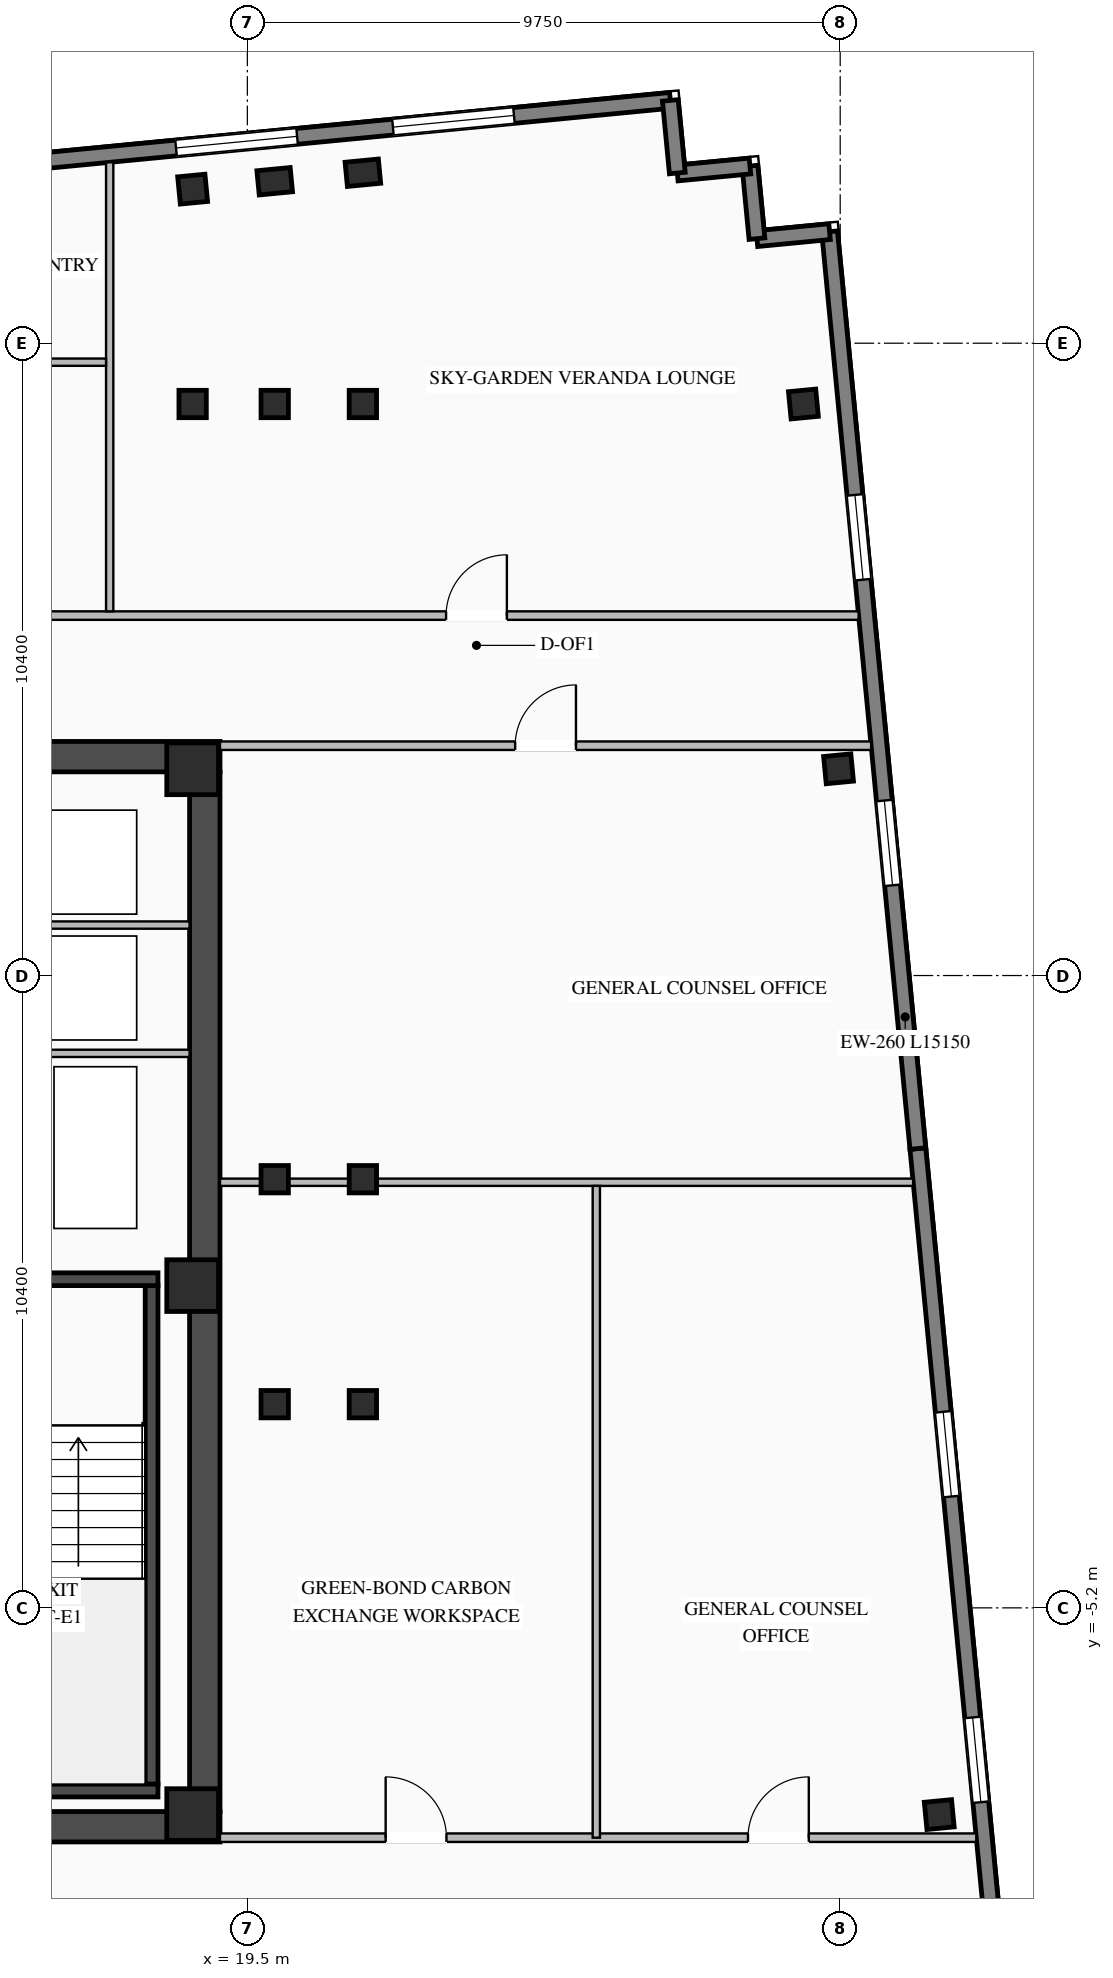
"""IFC4 building model, lengths in metres.
Left out: names, types, materials, properties, quantities, classifications, styles, units other than length and angle.
Written with IfcOpenShell. Run it as: python <this file> out.ifc"""

import sys

from ifc_helpers import new_model, si_unit, direction, frame, frame_2d, origin, origin_2d, place, context, subcontext, project, spatial, rectangle, i_section, extrude, element, fill, save


model = new_model("IFC4")
c1 = context("Model", 3, precision=1e-05, world=origin(), true_north=direction((0.0, 1.0)))
c2 = subcontext(c1, "Body", "Model", "MODEL_VIEW")
j1 = project(units=[si_unit("LENGTHUNIT", "METRE"), si_unit("PLANEANGLEUNIT", "RADIAN")], contexts=[c1])
p1 = place(None, origin())
s1 = spatial("IfcSite", under=j1, at=p1, CompositionType="ELEMENT")
p2 = place(p1, origin())
s2 = spatial("IfcBuilding", under=s1, at=p2, CompositionType="ELEMENT")
p3 = place(p2, frame((0.0, 0.0, 272.4)))
s3 = spatial("IfcBuildingStorey", under=s2, at=p3, CompositionType="ELEMENT", Elevation=272.4)
p4 = place(p3, frame((8.8, -8.8, 0.0), z_axis=(0.0, 0.0, 1.0), x_axis=(1.0, 0.0, 0.0)))
e1 = element("IfcWall", 1, at=p4, inside=s3, PredefinedType="SHEAR", context=c2, shape_type="SweptSolid", body=[
    extrude(rectangle(XDim=10.25, YDim=0.5, at=frame_2d((5.125, 0.0))), origin(), (0.0, 0.0, 1.0), 3.27),
])
p5 = place(p3, frame((8.8, 8.8, 0.0), z_axis=(0.0, 0.0, 1.0), x_axis=(1.0, 0.0, 0.0)))
e2 = element("IfcWall", 2, at=p5, inside=s3, PredefinedType="SHEAR", context=c2, shape_type="SweptSolid", body=[
    extrude(rectangle(XDim=10.25, YDim=0.5, at=frame_2d((5.125, 0.0))), origin(), (0.0, 0.0, 1.0), 3.27),
])
p6 = place(p5, frame((3.25, 0.0, 0.0)))
e3 = element("IfcOpeningElement", 3, at=p6, cuts=e2, PredefinedType="OPENING", context=c2, shape_type="SweptSolid", body=[
    extrude(rectangle(XDim=1.4, YDim=2.05, at=frame_2d((0.7, 1.025))), frame((0.0, 0.26, 0.0), z_axis=(0.0, -1.0, 0.0), x_axis=(1.0, 0.0, 0.0)), (0.0, 0.0, 1.0), 0.52),
])
p7 = place(p3, frame((18.8, -8.55, 0.0), z_axis=(0.0, 0.0, 1.0), x_axis=(0.0, 1.0, 0.0)))
e4 = element("IfcWall", 4, at=p7, inside=s3, PredefinedType="SHEAR", context=c2, shape_type="SweptSolid", body=[
    extrude(rectangle(XDim=17.1, YDim=0.5, at=frame_2d((8.55, 0.0))), origin(), (0.0, 0.0, 1.0), 3.27),
])
p8 = place(p3, frame((17.925, -8.1, 0.0), z_axis=(0.0, 0.0, 1.0), x_axis=(0.0, 1.0, 0.0)))
e5 = element("IfcWall", 5, at=p8, inside=s3, PredefinedType="SHEAR", context=c2, shape_type="SweptSolid", body=[
    extrude(rectangle(XDim=8.2, YDim=0.21, at=frame_2d((4.1, 0.0))), origin(), (0.0, 0.0, 1.0), 3.27),
])
for number, where, z_axis, x_axis in (
    (6, (12.89, -8.205, 0.0), (0.0, 0.0, 1.0), (1.0, 0.0, 0.0)),
    (7, (18.03, 0.205, 0.0), (0.0, 0.0, 1.0), (-1.0, 0.0, 0.0)),
):
    element("IfcWall", number, at=place(p3, frame(where, z_axis=z_axis, x_axis=x_axis)), inside=s3, PredefinedType="SHEAR", context=c2, shape_type="SweptSolid", body=[
        extrude(rectangle(XDim=5.14, YDim=0.21, at=frame_2d((2.57, 0.0))), origin(), (0.0, 0.0, 1.0), 3.27),
    ])
for number, where, z_axis, x_axis in (
    (8, (18.6, -8.6, 0.0), (0.0, 0.0, 1.0), (1.0, 0.0, 0.0)),
    (9, (18.6, 0.1, 0.0), (0.0, 0.0, 1.0), (1.0, 0.0, 0.0)),
    (10, (18.6, 8.6, 0.0), (0.0, 0.0, 1.0), (1.0, 0.0, 0.0)),
):
    element("IfcColumn", number, at=place(p3, frame(where, z_axis=z_axis, x_axis=x_axis)), inside=s3, PredefinedType="COLUMN", context=c2, shape_type="SweptSolid", body=[
        extrude(rectangle(XDim=0.85, YDim=0.85, at=origin_2d()), origin(), (0.0, 0.0, 1.0), 3.45),
    ])
for number, where, z_axis, x_axis in (
    (11, (18.6, 14.6, 0.0), (0.0, 0.0, 1.0), (1.0, 0.0, 0.0)),
    (12, (19.95, 14.6, 0.0), (0.0, 0.0, 1.0), (1.0, 0.0, 0.0)),
    (13, (21.4, 14.6, 0.0), (0.0, 0.0, 1.0), (1.0, 0.0, 0.0)),
    (14, (19.95, -1.85, 0.0), (0.0, 0.0, 1.0), (1.0, 0.0, 0.0)),
    (15, (19.95, 1.85, 0.0), (0.0, 0.0, 1.0), (1.0, 0.0, 0.0)),
    (16, (21.4, -1.85, 0.0), (0.0, 0.0, 1.0), (1.0, 0.0, 0.0)),
    (17, (21.4, 1.85, 0.0), (0.0, 0.0, 1.0), (1.0, 0.0, 0.0)),
    (18, (18.6, 18.134, 0.0), (0.0, 0.0, 1.0), (0.995, 0.096, 0.0)),
    (19, (30.879, -8.6, 0.0), (0.0, 0.0, 1.0), (0.995, 0.096, 0.0)),
    (20, (29.223, 8.6, 0.0), (0.0, 0.0, 1.0), (0.995, 0.096, 0.0)),
    (21, (28.645, 14.6, 0.0), (0.0, 0.0, 1.0), (0.995, 0.096, 0.0)),
):
    element("IfcColumn", number, at=place(p3, frame(where, z_axis=z_axis, x_axis=x_axis)), inside=s3, PredefinedType="COLUMN", context=c2, shape_type="SweptSolid", body=[
        extrude(i_section(OverallWidth=0.45, OverallDepth=0.45, WebThickness=0.022, FlangeThickness=0.032, at=origin_2d()), origin(), (0.0, 0.0, 1.0), 3.45),
    ])
for number, where, z_axis, x_axis in (
    (22, (19.95, 18.264, 0.0), (0.0, 0.0, 1.0), (0.995, 0.096, 0.0)),
    (23, (21.4, 18.403, 0.0), (0.0, 0.0, 1.0), (0.995, 0.096, 0.0)),
):
    element("IfcColumn", number, at=place(p3, frame(where, z_axis=z_axis, x_axis=x_axis)), inside=s3, PredefinedType="PILASTER", context=c2, shape_type="SweptSolid", body=[
        extrude(rectangle(XDim=0.55, YDim=0.4, at=origin_2d()), origin(), (0.0, 0.0, 1.0), 3.45),
    ])
p9 = place(p3, frame((15.756, 18.563, 0.0), z_axis=(0.0, 0.0, 1.0), x_axis=(0.995396745868, 0.095840066339, 0.0)))
e24 = element("IfcWall", 24, at=p9, inside=s3, PredefinedType="STANDARD", context=c2, shape_type="SweptSolid", body=[
    extrude(rectangle(XDim=10.75, YDim=0.26, at=frame_2d((5.375, 0.0))), origin(), (0.0, 0.0, 1.0), 3.25),
])
p10 = place(p9, frame((2.583, 0.0, 0.76)))
e25 = element("IfcOpeningElement", 25, at=p10, cuts=e24, PredefinedType="OPENING", context=c2, shape_type="SweptSolid", body=[
    extrude(rectangle(XDim=2.0, YDim=2.05, at=frame_2d((1.0, 1.025))), frame((0.0, 0.14, 0.0), z_axis=(0.0, -1.0, 0.0), x_axis=(1.0, 0.0, 0.0)), (0.0, 0.0, 1.0), 0.28),
])
p11 = place(p9, frame((6.167, 0.0, 0.76)))
e26 = element("IfcOpeningElement", 26, at=p11, cuts=e24, PredefinedType="OPENING", context=c2, shape_type="SweptSolid", body=[
    extrude(rectangle(XDim=2.0, YDim=2.05, at=frame_2d((1.0, 1.025))), frame((0.0, 0.14, 0.0), z_axis=(0.0, -1.0, 0.0), x_axis=(1.0, 0.0, 0.0)), (0.0, 0.0, 1.0), 0.28),
])
p12 = place(p3, frame((30.527, 2.354, 0.0), z_axis=(0.0, 0.0, 1.0), x_axis=(0.095850890337, -0.995395703638, 0.0)))
e27 = element("IfcWall", 27, at=p12, inside=s3, PredefinedType="STANDARD", context=c2, shape_type="SweptSolid", body=[
    extrude(rectangle(XDim=15.15, YDim=0.26, at=frame_2d((7.575, 0.0))), origin(), (0.0, 0.0, 1.0), 3.25),
])
p13 = place(p12, frame((4.35, 0.0, 0.76)))
e28 = element("IfcOpeningElement", 28, at=p13, cuts=e27, PredefinedType="OPENING", context=c2, shape_type="SweptSolid", body=[
    extrude(rectangle(XDim=1.4, YDim=1.95, at=frame_2d((0.7, 0.975))), frame((0.0, 0.14, 0.0), z_axis=(0.0, -1.0, 0.0), x_axis=(1.0, 0.0, 0.0)), (0.0, 0.0, 1.0), 0.28),
])
p14 = place(p12, frame((9.4, 0.0, 0.76)))
e29 = element("IfcOpeningElement", 29, at=p14, cuts=e27, PredefinedType="OPENING", context=c2, shape_type="SweptSolid", body=[
    extrude(rectangle(XDim=1.4, YDim=1.95, at=frame_2d((0.7, 0.975))), frame((0.0, 0.14, 0.0), z_axis=(0.0, -1.0, 0.0), x_axis=(1.0, 0.0, 0.0)), (0.0, 0.0, 1.0), 0.28),
])
p15 = place(p3, frame((29.075, 17.435, 0.0), z_axis=(0.0, 0.0, 1.0), x_axis=(0.095850890337, -0.995395703638, 0.0)))
e30 = element("IfcWall", 30, at=p15, inside=s3, PredefinedType="STANDARD", context=c2, shape_type="SweptSolid", body=[
    extrude(rectangle(XDim=15.15, YDim=0.26, at=frame_2d((7.575, 0.0))), origin(), (0.0, 0.0, 1.0), 3.25),
])
p16 = place(p15, frame((4.35, 0.0, 0.76)))
e31 = element("IfcOpeningElement", 31, at=p16, cuts=e30, PredefinedType="OPENING", context=c2, shape_type="SweptSolid", body=[
    extrude(rectangle(XDim=1.4, YDim=1.95, at=frame_2d((0.7, 0.975))), frame((0.0, 0.14, 0.0), z_axis=(0.0, -1.0, 0.0), x_axis=(1.0, 0.0, 0.0)), (0.0, 0.0, 1.0), 0.28),
])
p17 = place(p15, frame((9.4, 0.0, 0.76)))
e32 = element("IfcOpeningElement", 32, at=p17, cuts=e30, PredefinedType="OPENING", context=c2, shape_type="SweptSolid", body=[
    extrude(rectangle(XDim=1.4, YDim=1.95, at=frame_2d((0.7, 0.975))), frame((0.0, 0.14, 0.0), z_axis=(0.0, -1.0, 0.0), x_axis=(1.0, 0.0, 0.0)), (0.0, 0.0, 1.0), 0.28),
])
for number, where, z_axis, x_axis in (
    (33, (29.075, 17.435, 0.0), (0.0, 0.0, 1.0), (-0.995, -0.096, 0.0)),
    (34, (27.881, 17.32, 0.0), (0.0, 0.0, 1.0), (-0.096, 0.995, 0.0)),
):
    element("IfcWall", number, at=place(p3, frame(where, z_axis=z_axis, x_axis=x_axis)), inside=s3, PredefinedType="STANDARD", context=c2, shape_type="SweptSolid", body=[
        extrude(rectangle(XDim=1.2, YDim=0.26, at=frame_2d((0.6, 0.0))), origin(), (0.0, 0.0, 1.0), 3.25),
    ])
for number, where, z_axis, x_axis in (
    (35, (27.766, 18.514, 0.0), (0.0, 0.0, 1.0), (-0.995, -0.096, 0.0)),
    (36, (26.571, 18.399, 0.0), (0.0, 0.0, 1.0), (-0.096, 0.995, 0.0)),
):
    element("IfcWall", number, at=place(p3, frame(where, z_axis=z_axis, x_axis=x_axis)), inside=s3, PredefinedType="STANDARD", context=c2, shape_type="SweptSolid", body=[
        extrude(rectangle(XDim=1.2, YDim=0.26, at=frame_2d((0.6, 0.0))), origin(), (0.0, 0.0, 1.0), 3.25),
    ])
p18 = place(p3, frame((13.9, 3.92, 0.0), z_axis=(0.0, 0.0, 1.0), x_axis=(1.0, 0.0, 0.0)))
e37 = element("IfcWall", 37, at=p18, inside=s3, PredefinedType="STANDARD", context=c2, shape_type="SweptSolid", body=[
    extrude(rectangle(XDim=4.65, YDim=0.12, at=frame_2d((2.325, 0.0))), origin(), (0.0, 0.0, 1.0), 3.25),
])
p19 = place(p3, frame((16.15, 6.03, 0.0), z_axis=(0.0, 0.0, 1.0), x_axis=(1.0, 0.0, 0.0)))
e38 = element("IfcWall", 38, at=p19, inside=s3, PredefinedType="STANDARD", context=c2, shape_type="SweptSolid", body=[
    extrude(rectangle(XDim=2.4, YDim=0.12, at=frame_2d((1.2, 0.0))), origin(), (0.0, 0.0, 1.0), 3.25),
])
p20 = place(p3, frame((-23.733, 11.12, 0.0), z_axis=(0.0, 0.0, 1.0), x_axis=(1.0, 0.0, 0.0)))
e39 = element("IfcWall", 39, at=p20, inside=s3, PredefinedType="STANDARD", context=c2, shape_type="SweptSolid", body=[
    extrude(rectangle(XDim=53.285, YDim=0.14, at=frame_2d((26.643, 0.0))), origin(), (0.0, 0.0, 1.0), 3.25),
])
p21 = place(p20, frame((5.731, 0.0, 0.0)))
e40 = element("IfcOpeningElement", 40, at=p21, cuts=e39, PredefinedType="OPENING", context=c2, shape_type="SweptSolid", body=[
    extrude(rectangle(XDim=1.0, YDim=2.08, at=frame_2d((0.5, 1.04))), frame((0.0, 0.08, 0.0), z_axis=(0.0, -1.0, 0.0), x_axis=(1.0, 0.0, 0.0)), (0.0, 0.0, 1.0), 0.16),
])
p22 = place(p20, frame((18.9, 0.0, 0.0)))
e41 = element("IfcOpeningElement", 41, at=p22, cuts=e39, PredefinedType="OPENING", context=c2, shape_type="SweptSolid", body=[
    extrude(rectangle(XDim=1.0, YDim=2.08, at=frame_2d((0.5, 1.04))), frame((0.0, 0.08, 0.0), z_axis=(0.0, -1.0, 0.0), x_axis=(1.0, 0.0, 0.0)), (0.0, 0.0, 1.0), 0.16),
])
p23 = place(p20, frame((33.279, 0.0, 0.0)))
e42 = element("IfcOpeningElement", 42, at=p23, cuts=e39, PredefinedType="OPENING", context=c2, shape_type="SweptSolid", body=[
    extrude(rectangle(XDim=1.0, YDim=2.08, at=frame_2d((0.5, 1.04))), frame((0.0, 0.08, 0.0), z_axis=(0.0, -1.0, 0.0), x_axis=(1.0, 0.0, 0.0)), (0.0, 0.0, 1.0), 0.16),
])
p24 = place(p20, frame((46.501, 0.0, 0.0)))
e43 = element("IfcOpeningElement", 43, at=p24, cuts=e39, PredefinedType="OPENING", context=c2, shape_type="SweptSolid", body=[
    extrude(rectangle(XDim=1.0, YDim=2.08, at=frame_2d((0.5, 1.04))), frame((0.0, 0.08, 0.0), z_axis=(0.0, -1.0, 0.0), x_axis=(1.0, 0.0, 0.0)), (0.0, 0.0, 1.0), 0.16),
])
p25 = place(p3, frame((17.236, 11.19, 0.0), z_axis=(0.0, 0.0, 1.0), x_axis=(0.0, 1.0, 0.0)))
e44 = element("IfcWall", 44, at=p25, inside=s3, PredefinedType="STANDARD", context=c2, shape_type="SweptSolid", body=[
    extrude(rectangle(XDim=7.385, YDim=0.12, at=frame_2d((3.693, 0.0))), origin(), (0.0, 0.0, 1.0), 3.25),
])
p26 = place(p3, frame((-11.463, 15.288, 0.0), z_axis=(0.0, 0.0, 1.0), x_axis=(1.0, 0.0, 0.0)))
e45 = element("IfcWall", 45, at=p26, inside=s3, PredefinedType="STANDARD", context=c2, shape_type="SweptSolid", body=[
    extrude(rectangle(XDim=28.639, YDim=0.12, at=frame_2d((14.319, 0.0))), origin(), (0.0, 0.0, 1.0), 2.565),
])
p27 = place(p26, frame((6.787, 0.0, 0.0)))
e46 = element("IfcOpeningElement", 46, at=p27, cuts=e45, PredefinedType="OPENING", context=c2, shape_type="SweptSolid", body=[
    extrude(rectangle(XDim=1.0, YDim=2.08, at=frame_2d((0.5, 1.04))), frame((0.0, 0.07, 0.0), z_axis=(0.0, -1.0, 0.0), x_axis=(1.0, 0.0, 0.0)), (0.0, 0.0, 1.0), 0.14),
])
p28 = place(p26, frame((14.824, 0.0, 0.0)))
e47 = element("IfcOpeningElement", 47, at=p28, cuts=e45, PredefinedType="OPENING", context=c2, shape_type="SweptSolid", body=[
    extrude(rectangle(XDim=1.0, YDim=2.08, at=frame_2d((0.5, 1.04))), frame((0.0, 0.07, 0.0), z_axis=(0.0, -1.0, 0.0), x_axis=(1.0, 0.0, 0.0)), (0.0, 0.0, 1.0), 0.14),
])
p29 = place(p3, frame((19.05, 8.98, 0.0), z_axis=(0.0, 0.0, 1.0), x_axis=(1.0, 0.0, 0.0)))
e48 = element("IfcWall", 48, at=p29, inside=s3, PredefinedType="STANDARD", context=c2, shape_type="SweptSolid", body=[
    extrude(rectangle(XDim=10.709, YDim=0.14, at=frame_2d((5.354, 0.0))), origin(), (0.0, 0.0, 1.0), 3.25),
])
p30 = place(p29, frame((4.854, 0.0, 0.0)))
e49 = element("IfcOpeningElement", 49, at=p30, cuts=e48, PredefinedType="OPENING", context=c2, shape_type="SweptSolid", body=[
    extrude(rectangle(XDim=1.0, YDim=2.08, at=frame_2d((0.5, 1.04))), frame((0.0, 0.08, 0.0), z_axis=(0.0, -1.0, 0.0), x_axis=(1.0, 0.0, 0.0)), (0.0, 0.0, 1.0), 0.16),
])
p31 = place(p3, frame((19.05, -8.98, 0.0), z_axis=(0.0, 0.0, 1.0), x_axis=(1.0, 0.0, 0.0)))
e50 = element("IfcWall", 50, at=p31, inside=s3, PredefinedType="STANDARD", context=c2, shape_type="SweptSolid", body=[
    extrude(rectangle(XDim=12.438, YDim=0.14, at=frame_2d((6.219, 0.0))), origin(), (0.0, 0.0, 1.0), 3.25),
])
p32 = place(p31, frame((2.725, 0.0, 0.0)))
e51 = element("IfcOpeningElement", 51, at=p32, cuts=e50, PredefinedType="OPENING", context=c2, shape_type="SweptSolid", body=[
    extrude(rectangle(XDim=1.0, YDim=2.08, at=frame_2d((0.5, 1.04))), frame((0.0, 0.08, 0.0), z_axis=(0.0, -1.0, 0.0), x_axis=(1.0, 0.0, 0.0)), (0.0, 0.0, 1.0), 0.16),
])
p33 = place(p31, frame((8.684, 0.0, 0.0)))
e52 = element("IfcOpeningElement", 52, at=p33, cuts=e50, PredefinedType="OPENING", context=c2, shape_type="SweptSolid", body=[
    extrude(rectangle(XDim=1.0, YDim=2.08, at=frame_2d((0.5, 1.04))), frame((0.0, 0.08, 0.0), z_axis=(0.0, -1.0, 0.0), x_axis=(1.0, 0.0, 0.0)), (0.0, 0.0, 1.0), 0.16),
])
p34 = place(p3, frame((19.05, 1.8, 0.0), z_axis=(0.0, 0.0, 1.0), x_axis=(1.0, 0.0, 0.0)))
e53 = element("IfcWall", 53, at=p34, inside=s3, PredefinedType="STANDARD", context=c2, shape_type="SweptSolid", body=[
    extrude(rectangle(XDim=11.4, YDim=0.12, at=frame_2d((5.7, 0.0))), origin(), (0.0, 0.0, 1.0), 3.25),
])
p35 = place(p3, frame((25.239, -8.98, 0.0), z_axis=(0.0, 0.0, 1.0), x_axis=(0.0, 1.0, 0.0)))
e54 = element("IfcWall", 54, at=p35, inside=s3, PredefinedType="STANDARD", context=c2, shape_type="SweptSolid", body=[
    extrude(rectangle(XDim=10.72, YDim=0.12, at=frame_2d((5.36, 0.0))), origin(), (0.0, 0.0, 1.0), 3.25),
])
p36 = place(p10, origin())
e55 = element("IfcWindow", 55, at=p36, inside=s3, PartitioningType="DOUBLE_PANEL_VERTICAL", PredefinedType="WINDOW", context=c2, shape_type="SweptSolid", body=[
    extrude(rectangle(XDim=2.0, YDim=2.05, at=frame_2d((1.0, 1.025))), frame((0.0, 0.03, 0.0), z_axis=(0.0, -1.0, 0.0), x_axis=(1.0, 0.0, 0.0)), (0.0, 0.0, 1.0), 0.06),
])
fill(e25, e55)
p37 = place(p11, origin())
e56 = element("IfcWindow", 56, at=p37, inside=s3, PartitioningType="DOUBLE_PANEL_VERTICAL", PredefinedType="WINDOW", context=c2, shape_type="SweptSolid", body=[
    extrude(rectangle(XDim=2.0, YDim=2.05, at=frame_2d((1.0, 1.025))), frame((0.0, 0.03, 0.0), z_axis=(0.0, -1.0, 0.0), x_axis=(1.0, 0.0, 0.0)), (0.0, 0.0, 1.0), 0.06),
])
fill(e26, e56)
p38 = place(p13, origin())
e57 = element("IfcWindow", 57, at=p38, inside=s3, PartitioningType="SINGLE_PANEL", PredefinedType="WINDOW", context=c2, shape_type="SweptSolid", body=[
    extrude(rectangle(XDim=1.4, YDim=1.95, at=frame_2d((0.7, 0.975))), frame((0.0, 0.03, 0.0), z_axis=(0.0, -1.0, 0.0), x_axis=(1.0, 0.0, 0.0)), (0.0, 0.0, 1.0), 0.06),
])
fill(e28, e57)
p39 = place(p14, origin())
e58 = element("IfcWindow", 58, at=p39, inside=s3, PartitioningType="SINGLE_PANEL", PredefinedType="WINDOW", context=c2, shape_type="SweptSolid", body=[
    extrude(rectangle(XDim=1.4, YDim=1.95, at=frame_2d((0.7, 0.975))), frame((0.0, 0.03, 0.0), z_axis=(0.0, -1.0, 0.0), x_axis=(1.0, 0.0, 0.0)), (0.0, 0.0, 1.0), 0.06),
])
fill(e29, e58)
p40 = place(p16, origin())
e59 = element("IfcWindow", 59, at=p40, inside=s3, PartitioningType="SINGLE_PANEL", PredefinedType="WINDOW", context=c2, shape_type="SweptSolid", body=[
    extrude(rectangle(XDim=1.4, YDim=1.95, at=frame_2d((0.7, 0.975))), frame((0.0, 0.03, 0.0), z_axis=(0.0, -1.0, 0.0), x_axis=(1.0, 0.0, 0.0)), (0.0, 0.0, 1.0), 0.06),
])
fill(e31, e59)
p41 = place(p17, origin())
e60 = element("IfcWindow", 60, at=p41, inside=s3, PartitioningType="SINGLE_PANEL", PredefinedType="WINDOW", context=c2, shape_type="SweptSolid", body=[
    extrude(rectangle(XDim=1.4, YDim=1.95, at=frame_2d((0.7, 0.975))), frame((0.0, 0.03, 0.0), z_axis=(0.0, -1.0, 0.0), x_axis=(1.0, 0.0, 0.0)), (0.0, 0.0, 1.0), 0.06),
])
fill(e32, e60)
p42 = place(p24, origin())
e61 = element("IfcDoor", 61, at=p42, inside=s3, OperationType="SINGLE_SWING_RIGHT", PredefinedType="DOOR", context=c2, shape_type="SweptSolid", body=[
    extrude(rectangle(XDim=1.0, YDim=2.08, at=frame_2d((0.5, 1.04))), frame((0.0, 0.025, 0.0), z_axis=(0.0, -1.0, 0.0), x_axis=(1.0, 0.0, 0.0)), (0.0, 0.0, 1.0), 0.05),
])
fill(e43, e61)
p43 = place(p30, origin())
e62 = element("IfcDoor", 62, at=p43, inside=s3, OperationType="SINGLE_SWING_RIGHT", PredefinedType="DOOR", context=c2, shape_type="SweptSolid", body=[
    extrude(rectangle(XDim=1.0, YDim=2.08, at=frame_2d((0.5, 1.04))), frame((0.0, 0.025, 0.0), z_axis=(0.0, -1.0, 0.0), x_axis=(1.0, 0.0, 0.0)), (0.0, 0.0, 1.0), 0.05),
])
fill(e49, e62)
p44 = place(p32, origin())
e63 = element("IfcDoor", 63, at=p44, inside=s3, OperationType="SINGLE_SWING_LEFT", PredefinedType="DOOR", context=c2, shape_type="SweptSolid", body=[
    extrude(rectangle(XDim=1.0, YDim=2.08, at=frame_2d((0.5, 1.04))), frame((0.0, 0.025, 0.0), z_axis=(0.0, -1.0, 0.0), x_axis=(1.0, 0.0, 0.0)), (0.0, 0.0, 1.0), 0.05),
])
fill(e51, e63)
p45 = place(p33, origin())
e64 = element("IfcDoor", 64, at=p45, inside=s3, OperationType="SINGLE_SWING_RIGHT", PredefinedType="DOOR", context=c2, shape_type="SweptSolid", body=[
    extrude(rectangle(XDim=1.0, YDim=2.08, at=frame_2d((0.5, 1.04))), frame((0.0, 0.025, 0.0), z_axis=(0.0, -1.0, 0.0), x_axis=(1.0, 0.0, 0.0)), (0.0, 0.0, 1.0), 0.05),
])
fill(e52, e64)
save(model, sys.argv[1])
